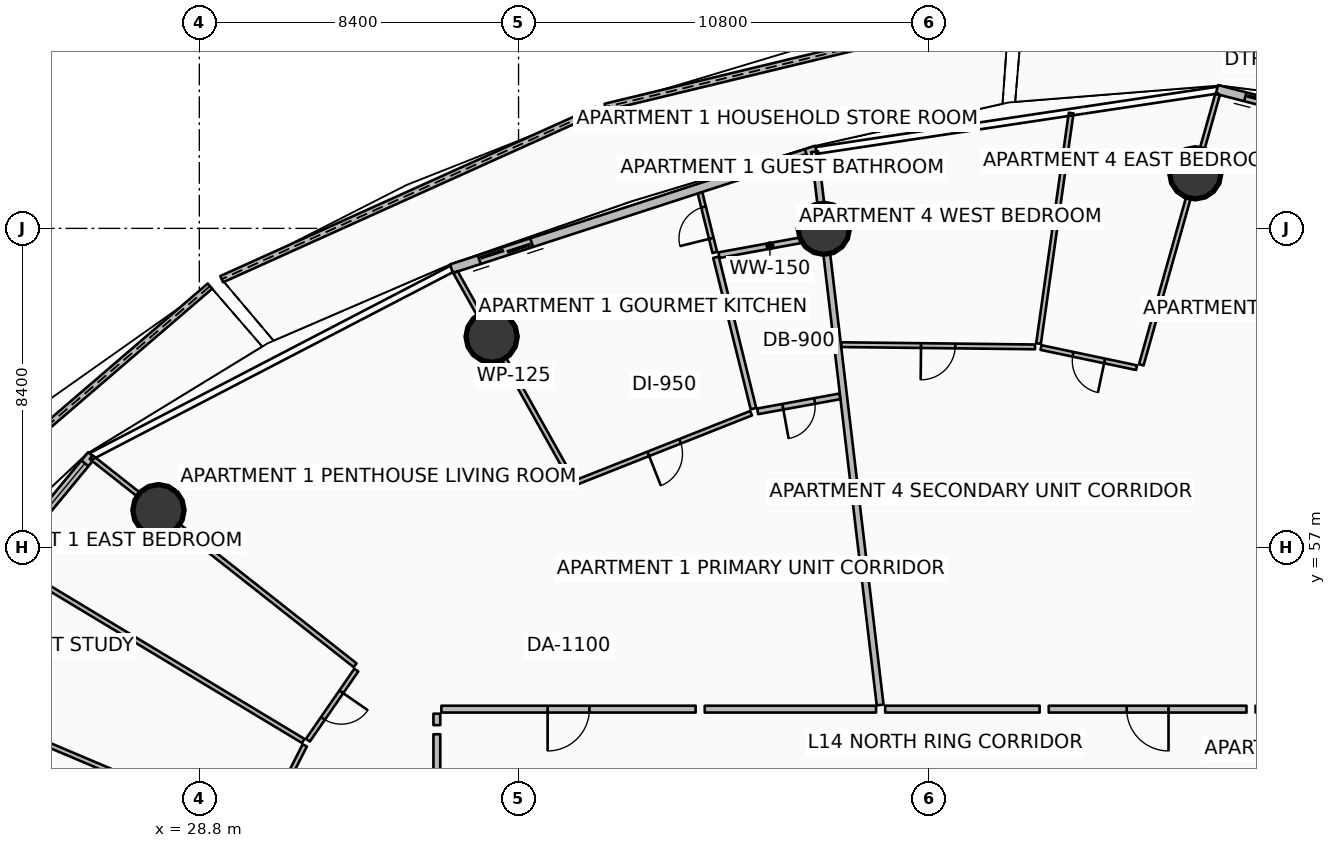
"""IFC4 building model, lengths in metres.
Left out: names, types, materials, properties, quantities, classifications, styles, units other than length and angle.
Written with IfcOpenShell. Run it as: python <this file> out.ifc"""

import sys

from ifc_helpers import new_model, si_unit, direction, frame, frame_2d, origin, origin_2d, place, context, subcontext, project, spatial, polyline, rectangle, circle, outline, extrude, element, fill, save


model = new_model("IFC4")
c1 = context("Model", 3, precision=1e-05, world=origin(), true_north=direction((0.0, 1.0)))
c2 = subcontext(c1, "Body", "Model", "MODEL_VIEW")
j1 = project(units=[si_unit("LENGTHUNIT", "METRE"), si_unit("PLANEANGLEUNIT", "RADIAN")], contexts=[c1])
p1 = place(None, origin())
s1 = spatial("IfcSite", under=j1, at=p1, CompositionType="ELEMENT")
p2 = place(p1, origin())
s2 = spatial("IfcBuilding", under=s1, at=p2, CompositionType="ELEMENT")
p3 = place(p2, frame((0.0, 0.0, 60.15)))
s3 = spatial("IfcBuildingStorey", under=s2, at=p3, CompositionType="ELEMENT", Elevation=60.15)
for number, where, z_axis, x_axis in (
    (1, (55.008, 66.849, 0.0), (0.0, 0.0, 1.0), (1.0, 0.0, 0.0)),
    (2, (45.232, 65.389, 0.0), (0.0, 0.0, 1.0), (1.0, 0.0, 0.0)),
    (3, (36.492, 62.55, 0.0), (0.0, 0.0, 1.0), (1.0, 0.0, 0.0)),
    (4, (27.724, 57.984, 0.0), (0.0, 0.0, 1.0), (1.0, 0.0, 0.0)),
):
    element("IfcColumn", number, at=place(p3, frame(where, z_axis=z_axis, x_axis=x_axis)), inside=s3, PredefinedType="COLUMN", context=c2, shape_type="SweptSolid", body=[
        extrude(circle(Radius=0.675, at=origin_2d()), origin(), (0.0, 0.0, 1.0), 3.5),
    ])
p4 = place(p3, frame((62.204, 70.123, 0.0), z_axis=(0.0, 0.0, 1.0), x_axis=(-0.99586852892, 0.09080678998, 0.0)))
e5 = element("IfcWall", 5, at=p4, inside=s3, PredefinedType="PARAPET", context=c2, shape_type="SweptSolid", body=[
    extrude(outline(polyline([(0.0, 0.0), (11.776, 0.0), (11.776, 1.747), (5.888, 1.562), (0.0, 1.348), (0.0, 0.0)])), frame((0.0, 0.09, 0.0), z_axis=(0.0, -1.0, 0.0), x_axis=(1.0, 0.0, 0.0)), (0.0, 0.0, 1.0), 0.18),
])
p5 = place(p3, frame((50.115, 71.153, 0.0), z_axis=(0.0, 0.0, 1.0), x_axis=(-0.972165741218, -0.234294198824, 0.0)))
e6 = element("IfcWall", 6, at=p5, inside=s3, PredefinedType="PARAPET", context=c2, shape_type="SweptSolid", body=[
    extrude(outline(polyline([(0.0, 0.0), (10.934, 0.0), (10.934, 1.832), (5.467, 1.853), (0.0, 1.756), (0.0, 0.0)])), frame((0.0, 0.09, 0.0), z_axis=(0.0, -1.0, 0.0), x_axis=(1.0, 0.0, 0.0)), (0.0, 0.0, 1.0), 0.18),
])
p6 = place(p3, frame((39.26, 68.514, 0.0), z_axis=(0.0, 0.0, 1.0), x_axis=(-0.911628502068, -0.411015175167, 0.0)))
e7 = element("IfcWall", 7, at=p6, inside=s3, PredefinedType="PARAPET", context=c2, shape_type="SweptSolid", body=[
    extrude(outline(polyline([(0.0, 0.0), (10.829, 0.0), (10.829, 1.497), (5.414, 1.696), (0.0, 1.832), (0.0, 0.0)])), frame((0.0, 0.09, 0.0), z_axis=(0.0, -1.0, 0.0), x_axis=(1.0, 0.0, 0.0)), (0.0, 0.0, 1.0), 0.18),
])
p7 = place(p3, frame((29.08, 63.881, 0.0), z_axis=(0.0, 0.0, 1.0), x_axis=(-0.758371329303, -0.651822772609, 0.0)))
e8 = element("IfcWall", 8, at=p7, inside=s3, PredefinedType="PARAPET", context=c2, shape_type="SweptSolid", body=[
    extrude(outline(polyline([(0.0, 0.0), (11.67, 0.0), (11.67, 1.148), (5.835, 1.284), (0.0, 1.483), (0.0, 0.0)])), frame((0.0, 0.09, 0.0), z_axis=(0.0, -1.0, 0.0), x_axis=(1.0, 0.0, 0.0)), (0.0, 0.0, 1.0), 0.18),
])
p8 = place(p3, frame((67.054, 66.096, 0.0), z_axis=(0.0, 0.0, 1.0), x_axis=(-0.96833871487, 0.249640007378, 0.0)))
e9 = element("IfcWall", 9, at=p8, inside=s3, PredefinedType="SOLIDWALL", context=c2, shape_type="SweptSolid", body=[
    extrude(rectangle(XDim=11.851, YDim=0.24, at=frame_2d((5.926, 0.0))), origin(), (0.0, 0.0, 1.0), 2.45),
])
p9 = place(p8, frame((9.631, 0.0, 0.0)))
e10 = element("IfcOpeningElement", 10, at=p9, cuts=e9, PredefinedType="OPENING", context=c2, shape_type="SweptSolid", body=[
    extrude(rectangle(XDim=1.45, YDim=2.15, at=frame_2d((0.725, 1.075))), frame((0.0, 0.13, 0.0), z_axis=(0.0, -1.0, 0.0), x_axis=(1.0, 0.0, 0.0)), (0.0, 0.0, 1.0), 0.26),
])
p10 = place(p8, frame((0.28, 0.0, 0.65)))
e11 = element("IfcOpeningElement", 11, at=p10, cuts=e9, PredefinedType="OPENING", context=c2, shape_type="SweptSolid", body=[
    extrude(rectangle(XDim=1.6, YDim=1.5, at=frame_2d((0.8, 0.75))), frame((0.0, 0.13, 0.0), z_axis=(0.0, -1.0, 0.0), x_axis=(1.0, 0.0, 0.0)), (0.0, 0.0, 1.0), 0.26),
])
p11 = place(p3, frame((45.036, 67.458, 0.0), z_axis=(0.0, 0.0, 1.0), x_axis=(-0.951054679225, -0.309022648238, 0.0)))
e12 = element("IfcWall", 12, at=p11, inside=s3, PredefinedType="SOLIDWALL", context=c2, shape_type="SweptSolid", body=[
    extrude(rectangle(XDim=10.097, YDim=0.24, at=frame_2d((5.048, 0.0))), origin(), (0.0, 0.0, 1.0), 2.45),
])
p12 = place(p11, frame((7.877, 0.0, 0.0)))
e13 = element("IfcOpeningElement", 13, at=p12, cuts=e12, PredefinedType="OPENING", context=c2, shape_type="SweptSolid", body=[
    extrude(rectangle(XDim=1.45, YDim=2.15, at=frame_2d((0.725, 1.075))), frame((0.0, 0.13, 0.0), z_axis=(0.0, -1.0, 0.0), x_axis=(1.0, 0.0, 0.0)), (0.0, 0.0, 1.0), 0.26),
])
p13 = place(p11, frame((0.28, 0.0, 0.65)))
e14 = element("IfcOpeningElement", 14, at=p13, cuts=e12, PredefinedType="OPENING", context=c2, shape_type="SweptSolid", body=[
    extrude(rectangle(XDim=1.6, YDim=1.5, at=frame_2d((0.8, 0.75))), frame((0.0, 0.13, 0.0), z_axis=(0.0, -1.0, 0.0), x_axis=(1.0, 0.0, 0.0)), (0.0, 0.0, 1.0), 0.26),
])
p14 = place(p3, frame((25.967, 59.433, 0.0), z_axis=(0.0, 0.0, 1.0), x_axis=(-0.636674332663, -0.771132799281, 0.0)))
e15 = element("IfcWall", 15, at=p14, inside=s3, PredefinedType="SOLIDWALL", context=c2, shape_type="SweptSolid", body=[
    extrude(rectangle(XDim=11.851, YDim=0.24, at=frame_2d((5.926, 0.0))), origin(), (0.0, 0.0, 1.0), 2.45),
])
p15 = place(p14, frame((9.631, 0.0, 0.0)))
e16 = element("IfcOpeningElement", 16, at=p15, cuts=e15, PredefinedType="OPENING", context=c2, shape_type="SweptSolid", body=[
    extrude(rectangle(XDim=1.45, YDim=2.15, at=frame_2d((0.725, 1.075))), frame((0.0, 0.13, 0.0), z_axis=(0.0, -1.0, 0.0), x_axis=(1.0, 0.0, 0.0)), (0.0, 0.0, 1.0), 0.26),
])
p16 = place(p14, frame((0.28, 0.0, 0.65)))
e17 = element("IfcOpeningElement", 17, at=p16, cuts=e15, PredefinedType="OPENING", context=c2, shape_type="SweptSolid", body=[
    extrude(rectangle(XDim=1.6, YDim=1.5, at=frame_2d((0.8, 0.75))), frame((0.0, 0.13, 0.0), z_axis=(0.0, -1.0, 0.0), x_axis=(1.0, 0.0, 0.0)), (0.0, 0.0, 1.0), 0.26),
])
p17 = place(p3, frame((46.715, 52.859, 0.0), z_axis=(0.0, 0.0, 1.0), x_axis=(-0.117534950089, 0.993068746617, 0.0)))
e18 = element("IfcWall", 18, at=p17, inside=s3, PredefinedType="PARTITIONING", context=c2, shape_type="SweptSolid", body=[
    extrude(rectangle(XDim=14.661, YDim=0.18, at=frame_2d((7.33, 0.0))), origin(), (0.0, 0.0, 1.0), 2.867),
])
p18 = place(p3, frame((41.86, 52.75, 0.0), z_axis=(0.0, 0.0, 1.0), x_axis=(-1.0, 0.0, 0.0)))
e19 = element("IfcWall", 19, at=p18, inside=s3, PredefinedType="PARTITIONING", context=c2, shape_type="SweptSolid", body=[
    extrude(rectangle(XDim=6.69, YDim=0.18, at=frame_2d((3.345, 0.0))), origin(), (0.0, 0.0, 1.0), 2.867),
])
p19 = place(p18, frame((2.795, 0.0, 0.0)))
e20 = element("IfcOpeningElement", 20, at=p19, cuts=e19, PredefinedType="OPENING", context=c2, shape_type="SweptSolid", body=[
    extrude(rectangle(XDim=1.1, YDim=2.1, at=frame_2d((0.55, 1.05))), frame((0.0, 0.1, 0.0), z_axis=(0.0, -1.0, 0.0), x_axis=(1.0, 0.0, 0.0)), (0.0, 0.0, 1.0), 0.2),
])
p20 = place(p3, frame((35.05, 52.63, 0.0), z_axis=(0.0, 0.0, 1.0), x_axis=(0.0, -1.0, 0.0)))
e21 = element("IfcWall", 21, at=p20, inside=s3, PredefinedType="PARTITIONING", context=c2, shape_type="SweptSolid", body=[
    extrude(rectangle(XDim=0.301, YDim=0.18, at=frame_2d((0.15, 0.0))), origin(), (0.0, 0.0, 1.0), 2.867),
])
p21 = place(p3, frame((46.608, 52.75, 0.0), z_axis=(0.0, 0.0, 1.0), x_axis=(-1.0, 0.0, 0.0)))
e22 = element("IfcWall", 22, at=p21, inside=s3, PredefinedType="PARTITIONING", context=c2, shape_type="SweptSolid", body=[
    extrude(rectangle(XDim=4.508, YDim=0.18, at=frame_2d((2.254, 0.0))), origin(), (0.0, 0.0, 1.0), 2.867),
])
p22 = place(p3, frame((38.604, 58.778, 0.0), z_axis=(0.0, 0.0, 1.0), x_axis=(-0.488617606889, 0.872498042541, 0.0)))
e23 = element("IfcWall", 23, at=p22, inside=s3, PredefinedType="PARTITIONING", context=c2, shape_type="SweptSolid", body=[
    extrude(rectangle(XDim=6.266, YDim=0.125, at=frame_2d((3.133, 0.0))), origin(), (0.0, 0.0, 1.0), 2.867),
])
p23 = place(p3, frame((45.653, 60.979, 0.0), z_axis=(0.0, 0.0, 1.0), x_axis=(-0.983791601568, -0.179315600783, 0.0)))
e24 = element("IfcWall", 24, at=p23, inside=s3, PredefinedType="PARTITIONING", context=c2, shape_type="SweptSolid", body=[
    extrude(rectangle(XDim=2.198, YDim=0.15, at=frame_2d((1.099, 0.0))), origin(), (0.0, 0.0, 1.0), 2.867),
])
p24 = place(p23, frame((0.674, 0.0, 0.0)))
e25 = element("IfcOpeningElement", 25, at=p24, cuts=e24, PredefinedType="OPENING", context=c2, shape_type="SweptSolid", body=[
    extrude(rectangle(XDim=0.85, YDim=2.06, at=frame_2d((0.425, 1.03))), frame((0.0, 0.085, 0.0), z_axis=(0.0, -1.0, 0.0), x_axis=(1.0, 0.0, 0.0)), (0.0, 0.0, 1.0), 0.17),
])
p25 = place(p3, frame((45.156, 65.184, 0.0), z_axis=(0.0, 0.0, 1.0), x_axis=(-0.983792433056, -0.179311038873, 0.0)))
e26 = element("IfcWall", 26, at=p25, inside=s3, PredefinedType="PARTITIONING", context=c2, shape_type="SweptSolid", body=[
    extrude(rectangle(XDim=2.726, YDim=0.15, at=frame_2d((1.363, 0.0))), origin(), (0.0, 0.0, 1.0), 2.867),
])
p26 = place(p3, frame((43.381, 60.657, 0.0), z_axis=(0.0, 0.0, 1.0), x_axis=(-0.240281337946, 0.97070329073, 0.0)))
e27 = element("IfcWall", 27, at=p26, inside=s3, PredefinedType="PARTITIONING", context=c2, shape_type="SweptSolid", body=[
    extrude(rectangle(XDim=4.104, YDim=0.15, at=frame_2d((2.052, 0.0))), origin(), (0.0, 0.0, 1.0), 2.94),
])
p27 = place(p3, frame((42.364, 64.767, 0.0), z_axis=(0.0, 0.0, 1.0), x_axis=(-0.240399183991, 0.970674112324, 0.0)))
e28 = element("IfcWall", 28, at=p27, inside=s3, PredefinedType="PARTITIONING", context=c2, shape_type="SweptSolid", body=[
    extrude(rectangle(XDim=1.614, YDim=0.125, at=frame_2d((0.807, 0.0))), origin(), (0.0, 0.0, 1.0), 2.94),
])
p28 = place(p27, frame((0.382, 0.0, 0.0)))
e29 = element("IfcOpeningElement", 29, at=p28, cuts=e28, PredefinedType="OPENING", context=c2, shape_type="SweptSolid", body=[
    extrude(rectangle(XDim=0.85, YDim=2.06, at=frame_2d((0.425, 1.03))), frame((0.0, 0.073, 0.0), z_axis=(0.0, -1.0, 0.0), x_axis=(1.0, 0.0, 0.0)), (0.0, 0.0, 1.0), 0.145),
])
p29 = place(p3, frame((43.319, 60.536, 0.0), z_axis=(0.0, 0.0, 1.0), x_axis=(-0.929910978534, -0.367784681576, 0.0)))
e30 = element("IfcWall", 30, at=p29, inside=s3, PredefinedType="PARTITIONING", context=c2, shape_type="SweptSolid", body=[
    extrude(rectangle(XDim=4.918, YDim=0.125, at=frame_2d((2.459, 0.0))), origin(), (0.0, 0.0, 1.0), 2.867),
])
p30 = place(p29, frame((2.009, 0.0, 0.0)))
e31 = element("IfcOpeningElement", 31, at=p30, cuts=e30, PredefinedType="OPENING", context=c2, shape_type="SweptSolid", body=[
    extrude(rectangle(XDim=0.9, YDim=2.08, at=frame_2d((0.45, 1.04))), frame((0.0, 0.073, 0.0), z_axis=(0.0, -1.0, 0.0), x_axis=(1.0, 0.0, 0.0)), (0.0, 0.0, 1.0), 0.145),
])
p31 = place(p3, frame((35.05, 52.089, 0.0), z_axis=(0.0, 0.0, 1.0), x_axis=(0.0, -1.0, 0.0)))
e32 = element("IfcWall", 32, at=p31, inside=s3, PredefinedType="PARTITIONING", context=c2, shape_type="SweptSolid", body=[
    extrude(rectangle(XDim=6.317, YDim=0.18, at=frame_2d((3.158, 0.0))), origin(), (0.0, 0.0, 1.0), 2.867),
])
p32 = place(p3, frame((32.898, 53.905, 0.0), z_axis=(0.0, 0.0, 1.0), x_axis=(-0.78532854108, 0.619079221558, 0.0)))
e33 = element("IfcWall", 33, at=p32, inside=s3, PredefinedType="PARTITIONING", context=c2, shape_type="SweptSolid", body=[
    extrude(rectangle(XDim=8.842, YDim=0.125, at=frame_2d((4.421, 0.0))), origin(), (0.0, 0.0, 1.0), 2.867),
])
p33 = place(p3, frame((31.534, 51.913, 0.0), z_axis=(0.0, 0.0, 1.0), x_axis=(-0.856706990958, 0.515803384676, 0.0)))
e34 = element("IfcWall", 34, at=p33, inside=s3, PredefinedType="PARTITIONING", context=c2, shape_type="SweptSolid", body=[
    extrude(rectangle(XDim=9.057, YDim=0.125, at=frame_2d((4.528, 0.0))), origin(), (0.0, 0.0, 1.0), 2.94),
])
p34 = place(p3, frame((30.301, 49.494, 0.0), z_axis=(0.0, 0.0, 1.0), x_axis=(-0.920840746031, 0.389938867579, 0.0)))
e35 = element("IfcWall", 35, at=p34, inside=s3, PredefinedType="PARTITIONING", context=c2, shape_type="SweptSolid", body=[
    extrude(rectangle(XDim=9.966, YDim=0.125, at=frame_2d((4.983, 0.0))), origin(), (0.0, 0.0, 1.0), 2.94),
])
p35 = place(p3, frame((32.931, 53.778, 0.0), z_axis=(0.0, 0.0, 1.0), x_axis=(-0.568541738061, -0.822654418382, 0.0)))
e36 = element("IfcWall", 36, at=p35, inside=s3, PredefinedType="PARTITIONING", context=c2, shape_type="SweptSolid", body=[
    extrude(rectangle(XDim=2.242, YDim=0.125, at=frame_2d((1.121, 0.0))), origin(), (0.0, 0.0, 1.0), 2.867),
])
p36 = place(p35, frame((0.696, 0.0, 0.0)))
e37 = element("IfcOpeningElement", 37, at=p36, cuts=e36, PredefinedType="OPENING", context=c2, shape_type="SweptSolid", body=[
    extrude(rectangle(XDim=0.85, YDim=2.06, at=frame_2d((0.425, 1.03))), frame((0.0, 0.073, 0.0), z_axis=(0.0, -1.0, 0.0), x_axis=(1.0, 0.0, 0.0)), (0.0, 0.0, 1.0), 0.145),
])
p37 = place(p3, frame((31.575, 51.796, 0.0), z_axis=(0.0, 0.0, 1.0), x_axis=(-0.454037986735, -0.890982326762, 0.0)))
e38 = element("IfcWall", 38, at=p37, inside=s3, PredefinedType="PARTITIONING", context=c2, shape_type="SweptSolid", body=[
    extrude(rectangle(XDim=2.542, YDim=0.125, at=frame_2d((1.271, 0.0))), origin(), (0.0, 0.0, 1.0), 2.94),
])
p38 = place(p37, frame((0.846, 0.0, 0.0)))
e39 = element("IfcOpeningElement", 39, at=p38, cuts=e38, PredefinedType="OPENING", context=c2, shape_type="SweptSolid", body=[
    extrude(rectangle(XDim=0.85, YDim=2.06, at=frame_2d((0.425, 1.03))), frame((0.0, 0.073, 0.0), z_axis=(0.0, -1.0, 0.0), x_axis=(1.0, 0.0, 0.0)), (0.0, 0.0, 1.0), 0.145),
])
p39 = place(p3, frame((56.354, 52.75, 0.0), z_axis=(0.0, 0.0, 1.0), x_axis=(-1.0, 0.0, 0.0)))
e40 = element("IfcWall", 40, at=p39, inside=s3, PredefinedType="PARTITIONING", context=c2, shape_type="SweptSolid", body=[
    extrude(rectangle(XDim=5.203, YDim=0.18, at=frame_2d((2.601, 0.0))), origin(), (0.0, 0.0, 1.0), 2.867),
])
p40 = place(p39, frame((2.052, 0.0, 0.0)))
e41 = element("IfcOpeningElement", 41, at=p40, cuts=e40, PredefinedType="OPENING", context=c2, shape_type="SweptSolid", body=[
    extrude(rectangle(XDim=1.1, YDim=2.1, at=frame_2d((0.55, 1.05))), frame((0.0, 0.1, 0.0), z_axis=(0.0, -1.0, 0.0), x_axis=(1.0, 0.0, 0.0)), (0.0, 0.0, 1.0), 0.2),
])
p41 = place(p3, frame((61.68, 52.75, 0.0), z_axis=(0.0, 0.0, 1.0), x_axis=(-1.0, 0.0, 0.0)))
e42 = element("IfcWall", 42, at=p41, inside=s3, PredefinedType="PARTITIONING", context=c2, shape_type="SweptSolid", body=[
    extrude(rectangle(XDim=5.085, YDim=0.18, at=frame_2d((2.543, 0.0))), origin(), (0.0, 0.0, 1.0), 2.867),
])
p42 = place(p3, frame((50.912, 52.75, 0.0), z_axis=(0.0, 0.0, 1.0), x_axis=(-1.0, 0.0, 0.0)))
e43 = element("IfcWall", 43, at=p42, inside=s3, PredefinedType="PARTITIONING", context=c2, shape_type="SweptSolid", body=[
    extrude(rectangle(XDim=4.064, YDim=0.18, at=frame_2d((2.032, 0.0))), origin(), (0.0, 0.0, 1.0), 2.867),
])
p43 = place(p3, frame((53.587, 61.81, 0.0), z_axis=(0.0, 0.0, 1.0), x_axis=(0.271464088879, 0.962448569249, 0.0)))
e44 = element("IfcWall", 44, at=p43, inside=s3, PredefinedType="PARTITIONING", context=c2, shape_type="SweptSolid", body=[
    extrude(rectangle(XDim=7.389, YDim=0.125, at=frame_2d((3.695, 0.0))), origin(), (0.0, 0.0, 1.0), 2.867),
])
p44 = place(p3, frame((50.883, 62.37, 0.0), z_axis=(0.0, 0.0, 1.0), x_axis=(0.140126411414, 0.990133621702, 0.0)))
e45 = element("IfcWall", 45, at=p44, inside=s3, PredefinedType="PARTITIONING", context=c2, shape_type="SweptSolid", body=[
    extrude(rectangle(XDim=6.124, YDim=0.125, at=frame_2d((3.062, 0.0))), origin(), (0.0, 0.0, 1.0), 2.94),
])
p45 = place(p3, frame((53.462, 61.735, 0.0), z_axis=(0.0, 0.0, 1.0), x_axis=(-0.978499333356, 0.206249980902, 0.0)))
e46 = element("IfcWall", 46, at=p45, inside=s3, PredefinedType="PARTITIONING", context=c2, shape_type="SweptSolid", body=[
    extrude(rectangle(XDim=2.569, YDim=0.125, at=frame_2d((1.284, 0.0))), origin(), (0.0, 0.0, 1.0), 2.867),
])
p46 = place(p45, frame((0.859, 0.0, 0.0)))
e47 = element("IfcOpeningElement", 47, at=p46, cuts=e46, PredefinedType="OPENING", context=c2, shape_type="SweptSolid", body=[
    extrude(rectangle(XDim=0.85, YDim=2.06, at=frame_2d((0.425, 1.03))), frame((0.0, 0.073, 0.0), z_axis=(0.0, -1.0, 0.0), x_axis=(1.0, 0.0, 0.0)), (0.0, 0.0, 1.0), 0.145),
])
p47 = place(p3, frame((50.79, 62.282, 0.0), z_axis=(0.0, 0.0, 1.0), x_axis=(-0.99993505002, 0.011397181261, 0.0)))
e48 = element("IfcWall", 48, at=p47, inside=s3, PredefinedType="PARTITIONING", context=c2, shape_type="SweptSolid", body=[
    extrude(rectangle(XDim=5.098, YDim=0.125, at=frame_2d((2.549, 0.0))), origin(), (0.0, 0.0, 1.0), 2.867),
])
p48 = place(p47, frame((2.099, 0.0, 0.0)))
e49 = element("IfcOpeningElement", 49, at=p48, cuts=e48, PredefinedType="OPENING", context=c2, shape_type="SweptSolid", body=[
    extrude(rectangle(XDim=0.9, YDim=2.08, at=frame_2d((0.45, 1.04))), frame((0.0, 0.073, 0.0), z_axis=(0.0, -1.0, 0.0), x_axis=(1.0, 0.0, 0.0)), (0.0, 0.0, 1.0), 0.145),
])
p49 = place(p9, origin())
e50 = element("IfcDoor", 50, at=p49, inside=s3, OperationType="DOUBLE_DOOR_SLIDING", PredefinedType="DOOR", context=c2, shape_type="SweptSolid", body=[
    extrude(rectangle(XDim=1.45, YDim=2.15, at=frame_2d((0.725, 1.075))), frame((0.0, 0.025, 0.0), z_axis=(0.0, -1.0, 0.0), x_axis=(1.0, 0.0, 0.0)), (0.0, 0.0, 1.0), 0.05),
])
fill(e10, e50)
p50 = place(p12, origin())
e51 = element("IfcDoor", 51, at=p50, inside=s3, OperationType="DOUBLE_DOOR_SLIDING", PredefinedType="DOOR", context=c2, shape_type="SweptSolid", body=[
    extrude(rectangle(XDim=1.45, YDim=2.15, at=frame_2d((0.725, 1.075))), frame((0.0, 0.025, 0.0), z_axis=(0.0, -1.0, 0.0), x_axis=(1.0, 0.0, 0.0)), (0.0, 0.0, 1.0), 0.05),
])
fill(e13, e51)
p51 = place(p13, origin())
e52 = element("IfcWindow", 52, at=p51, inside=s3, PartitioningType="SINGLE_PANEL", PredefinedType="WINDOW", context=c2, shape_type="SweptSolid", body=[
    extrude(rectangle(XDim=1.6, YDim=1.5, at=frame_2d((0.8, 0.75))), frame((0.0, 0.03, 0.0), z_axis=(0.0, -1.0, 0.0), x_axis=(1.0, 0.0, 0.0)), (0.0, 0.0, 1.0), 0.06),
])
fill(e14, e52)
p52 = place(p16, origin())
e53 = element("IfcWindow", 53, at=p52, inside=s3, PartitioningType="SINGLE_PANEL", PredefinedType="WINDOW", context=c2, shape_type="SweptSolid", body=[
    extrude(rectangle(XDim=1.6, YDim=1.5, at=frame_2d((0.8, 0.75))), frame((0.0, 0.03, 0.0), z_axis=(0.0, -1.0, 0.0), x_axis=(1.0, 0.0, 0.0)), (0.0, 0.0, 1.0), 0.06),
])
fill(e17, e53)
p53 = place(p19, origin())
e54 = element("IfcDoor", 54, at=p53, inside=s3, OperationType="SINGLE_SWING_RIGHT", PredefinedType="DOOR", context=c2, shape_type="SweptSolid", body=[
    extrude(rectangle(XDim=1.1, YDim=2.1, at=frame_2d((0.55, 1.05))), frame((0.0, 0.025, 0.0), z_axis=(0.0, -1.0, 0.0), x_axis=(1.0, 0.0, 0.0)), (0.0, 0.0, 1.0), 0.05),
])
fill(e20, e54)
p54 = place(p24, origin())
e55 = element("IfcDoor", 55, at=p54, inside=s3, OperationType="SINGLE_SWING_RIGHT", PredefinedType="DOOR", context=c2, shape_type="SweptSolid", body=[
    extrude(rectangle(XDim=0.85, YDim=2.06, at=frame_2d((0.425, 1.03))), frame((0.0, 0.025, 0.0), z_axis=(0.0, -1.0, 0.0), x_axis=(1.0, 0.0, 0.0)), (0.0, 0.0, 1.0), 0.05),
])
fill(e25, e55)
p55 = place(p28, origin())
e56 = element("IfcDoor", 56, at=p55, inside=s3, OperationType="SINGLE_SWING_LEFT", PredefinedType="DOOR", context=c2, shape_type="SweptSolid", body=[
    extrude(rectangle(XDim=0.85, YDim=2.06, at=frame_2d((0.425, 1.03))), frame((0.0, 0.025, 0.0), z_axis=(0.0, -1.0, 0.0), x_axis=(1.0, 0.0, 0.0)), (0.0, 0.0, 1.0), 0.05),
])
fill(e29, e56)
p56 = place(p30, origin())
e57 = element("IfcDoor", 57, at=p56, inside=s3, OperationType="SINGLE_SWING_RIGHT", PredefinedType="DOOR", context=c2, shape_type="SweptSolid", body=[
    extrude(rectangle(XDim=0.9, YDim=2.08, at=frame_2d((0.45, 1.04))), frame((0.0, 0.025, 0.0), z_axis=(0.0, -1.0, 0.0), x_axis=(1.0, 0.0, 0.0)), (0.0, 0.0, 1.0), 0.05),
])
fill(e31, e57)
p57 = place(p36, origin())
e58 = element("IfcDoor", 58, at=p57, inside=s3, OperationType="SINGLE_SWING_LEFT", PredefinedType="DOOR", context=c2, shape_type="SweptSolid", body=[
    extrude(rectangle(XDim=0.85, YDim=2.06, at=frame_2d((0.425, 1.03))), frame((0.0, 0.025, 0.0), z_axis=(0.0, -1.0, 0.0), x_axis=(1.0, 0.0, 0.0)), (0.0, 0.0, 1.0), 0.05),
])
fill(e37, e58)
p58 = place(p40, origin())
e59 = element("IfcDoor", 59, at=p58, inside=s3, OperationType="SINGLE_SWING_LEFT", PredefinedType="DOOR", context=c2, shape_type="SweptSolid", body=[
    extrude(rectangle(XDim=1.1, YDim=2.1, at=frame_2d((0.55, 1.05))), frame((0.0, 0.025, 0.0), z_axis=(0.0, -1.0, 0.0), x_axis=(1.0, 0.0, 0.0)), (0.0, 0.0, 1.0), 0.05),
])
fill(e41, e59)
p59 = place(p46, origin())
e60 = element("IfcDoor", 60, at=p59, inside=s3, OperationType="SINGLE_SWING_LEFT", PredefinedType="DOOR", context=c2, shape_type="SweptSolid", body=[
    extrude(rectangle(XDim=0.85, YDim=2.06, at=frame_2d((0.425, 1.03))), frame((0.0, 0.025, 0.0), z_axis=(0.0, -1.0, 0.0), x_axis=(1.0, 0.0, 0.0)), (0.0, 0.0, 1.0), 0.05),
])
fill(e47, e60)
p60 = place(p48, origin())
e61 = element("IfcDoor", 61, at=p60, inside=s3, OperationType="SINGLE_SWING_RIGHT", PredefinedType="DOOR", context=c2, shape_type="SweptSolid", body=[
    extrude(rectangle(XDim=0.9, YDim=2.08, at=frame_2d((0.45, 1.04))), frame((0.0, 0.025, 0.0), z_axis=(0.0, -1.0, 0.0), x_axis=(1.0, 0.0, 0.0)), (0.0, 0.0, 1.0), 0.05),
])
fill(e49, e61)
save(model, sys.argv[1])
